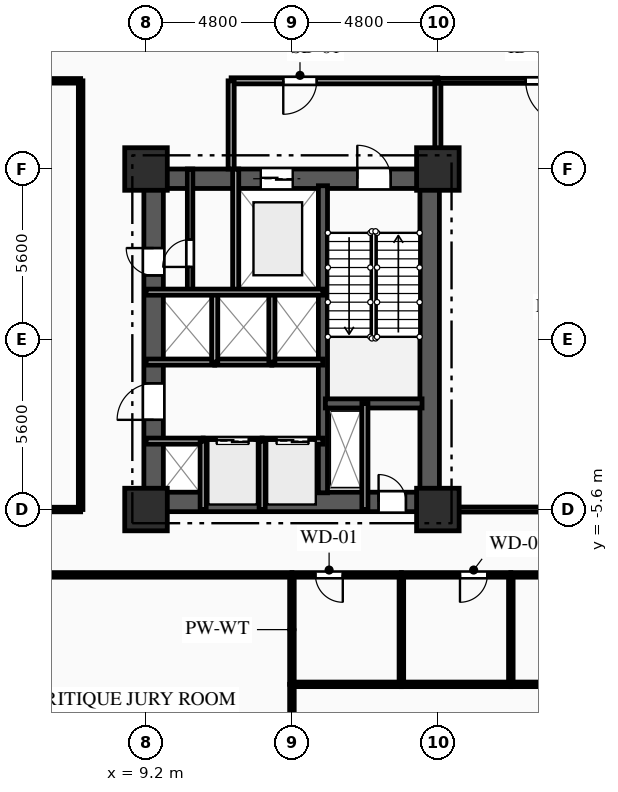
"""IFC4 building model, lengths in metres.
Left out: names, types, materials, properties, quantities, classifications, styles, units other than length and angle.
Written with IfcOpenShell. Run it as: python <this file> out.ifc"""

import sys

from ifc_helpers import new_model, si_unit, direction, frame, frame_2d, origin, origin_2d, place, context, subcontext, project, spatial, rectangle, extrude, element, fill, save


model = new_model("IFC4")
c1 = context("Model", 3, precision=1e-05, world=origin(), true_north=direction((0.0, 1.0)))
c2 = subcontext(c1, "Body", "Model", "MODEL_VIEW")
j1 = project(units=[si_unit("LENGTHUNIT", "METRE"), si_unit("PLANEANGLEUNIT", "RADIAN")], contexts=[c1])
p1 = place(None, origin())
s1 = spatial("IfcSite", under=j1, at=p1, CompositionType="ELEMENT")
p2 = place(p1, origin())
s2 = spatial("IfcBuilding", under=s1, at=p2, CompositionType="ELEMENT")
p3 = place(p2, frame((0.0, 0.0, 9.0)))
s3 = spatial("IfcBuildingStorey", under=s2, at=p3, CompositionType="ELEMENT", Elevation=9.0)
for number, where, z_axis, x_axis in (
    (1, (9.2, -5.6, 0.0), (0.0, 0.0, 1.0), (1.0, 0.0, 0.0)),
    (2, (9.2, 5.6, 0.0), (0.0, 0.0, 1.0), (1.0, 0.0, 0.0)),
    (3, (18.8, -5.6, 0.0), (0.0, 0.0, 1.0), (1.0, 0.0, 0.0)),
    (4, (18.8, 5.6, 0.0), (0.0, 0.0, 1.0), (1.0, 0.0, 0.0)),
):
    element("IfcColumn", number, at=place(p3, frame(where, z_axis=z_axis, x_axis=x_axis)), inside=s3, PredefinedType="COLUMN", context=c2, shape_type="SweptSolid", body=[
        extrude(rectangle(XDim=1.4, YDim=1.4, at=origin_2d()), origin(), (0.0, 0.0, 1.0), 4.5),
    ])
p4 = place(p3, frame((9.2, 5.28, 0.0), z_axis=(0.0, 0.0, 1.0), x_axis=(1.0, 0.0, 0.0)))
e5 = element("IfcWall", 5, at=p4, inside=s3, PredefinedType="SHEAR", context=c2, shape_type="SweptSolid", body=[
    extrude(rectangle(XDim=9.6, YDim=0.64, at=frame_2d((4.8, 0.0))), origin(), (0.0, 0.0, 1.0), 4.17),
])
p5 = place(p4, frame((6.95, 0.0, 0.0)))
e6 = element("IfcOpeningElement", 6, at=p5, cuts=e5, PredefinedType="OPENING", context=c2, shape_type="SweptSolid", body=[
    extrude(rectangle(XDim=1.1, YDim=2.15, at=frame_2d((0.55, 1.075))), frame((0.0, 0.33, 0.0), z_axis=(0.0, -1.0, 0.0), x_axis=(1.0, 0.0, 0.0)), (0.0, 0.0, 1.0), 0.66),
])
p6 = place(p4, frame((3.775, 0.0, 0.0)))
e7 = element("IfcOpeningElement", 7, at=p6, cuts=e5, PredefinedType="OPENING", context=c2, shape_type="SweptSolid", body=[
    extrude(rectangle(XDim=1.05, YDim=2.1, at=frame_2d((0.525, 1.05))), frame((0.0, 0.33, 0.0), z_axis=(0.0, -1.0, 0.0), x_axis=(1.0, 0.0, 0.0)), (0.0, 0.0, 1.0), 0.66),
])
p7 = place(p3, frame((9.2, -5.35, 0.0), z_axis=(0.0, 0.0, 1.0), x_axis=(1.0, 0.0, 0.0)))
e8 = element("IfcWall", 8, at=p7, inside=s3, PredefinedType="SHEAR", context=c2, shape_type="SweptSolid", body=[
    extrude(rectangle(XDim=9.6, YDim=0.64, at=frame_2d((4.8, 0.0))), origin(), (0.0, 0.0, 1.0), 4.17),
])
p8 = place(p7, frame((7.65, 0.0, 0.0)))
e9 = element("IfcOpeningElement", 9, at=p8, cuts=e8, PredefinedType="OPENING", context=c2, shape_type="SweptSolid", body=[
    extrude(rectangle(XDim=0.9, YDim=2.1, at=frame_2d((0.45, 1.05))), frame((0.0, 0.33, 0.0), z_axis=(0.0, -1.0, 0.0), x_axis=(1.0, 0.0, 0.0)), (0.0, 0.0, 1.0), 0.66),
])
p9 = place(p3, frame((9.45, -5.05, 0.0), z_axis=(0.0, 0.0, 1.0), x_axis=(0.0, 1.0, 0.0)))
e10 = element("IfcWall", 10, at=p9, inside=s3, PredefinedType="SHEAR", context=c2, shape_type="SweptSolid", body=[
    extrude(rectangle(XDim=10.1, YDim=0.64, at=frame_2d((5.05, 0.0))), origin(), (0.0, 0.0, 1.0), 4.17),
])
p10 = place(p9, frame((7.15, 0.0, 0.0)))
e11 = element("IfcOpeningElement", 11, at=p10, cuts=e10, PredefinedType="OPENING", context=c2, shape_type="SweptSolid", body=[
    extrude(rectangle(XDim=0.9, YDim=2.1, at=frame_2d((0.45, 1.05))), frame((0.0, 0.33, 0.0), z_axis=(0.0, -1.0, 0.0), x_axis=(1.0, 0.0, 0.0)), (0.0, 0.0, 1.0), 0.66),
])
p11 = place(p9, frame((2.4, 0.0, 0.0)))
e12 = element("IfcOpeningElement", 12, at=p11, cuts=e10, PredefinedType="OPENING", context=c2, shape_type="SweptSolid", body=[
    extrude(rectangle(XDim=1.2, YDim=2.15, at=frame_2d((0.6, 1.075))), frame((0.0, 0.33, 0.0), z_axis=(0.0, -1.0, 0.0), x_axis=(1.0, 0.0, 0.0)), (0.0, 0.0, 1.0), 0.66),
])
p12 = place(p3, frame((18.53, -5.05, 0.0), z_axis=(0.0, 0.0, 1.0), x_axis=(0.0, 1.0, 0.0)))
e13 = element("IfcWall", 13, at=p12, inside=s3, PredefinedType="SHEAR", context=c2, shape_type="SweptSolid", body=[
    extrude(rectangle(XDim=10.1, YDim=0.64, at=frame_2d((5.05, 0.0))), origin(), (0.0, 0.0, 1.0), 4.17),
])
p13 = place(p3, frame((15.02, -5.05, 0.0), z_axis=(0.0, 0.0, 1.0), x_axis=(0.0, 1.0, 0.0)))
e14 = element("IfcWall", 14, at=p13, inside=s3, PredefinedType="SHEAR", context=c2, shape_type="SweptSolid", body=[
    extrude(rectangle(XDim=10.1, YDim=0.3, at=frame_2d((5.05, 0.0))), origin(), (0.0, 0.0, 1.0), 4.17),
])
p14 = place(p3, frame((15.1, -2.11, 0.0), z_axis=(0.0, 0.0, 1.0), x_axis=(1.0, 0.0, 0.0)))
e15 = element("IfcWall", 15, at=p14, inside=s3, PredefinedType="SHEAR", context=c2, shape_type="SweptSolid", body=[
    extrude(rectangle(XDim=3.18, YDim=0.3, at=frame_2d((1.59, 0.0))), origin(), (0.0, 0.0, 1.0), 4.17),
])
p15 = place(p3, frame((16.4, -2.11, 0.0), z_axis=(0.0, 0.0, 1.0), x_axis=(0.0, -1.0, 0.0)))
e16 = element("IfcWall", 16, at=p15, inside=s3, PredefinedType="PARTITIONING", context=c2, shape_type="SweptSolid", body=[
    extrude(rectangle(XDim=3.49, YDim=0.2, at=frame_2d((1.745, 0.0))), origin(), (0.0, 0.0, 1.0), 4.17),
])
p16 = place(p3, frame((12.15, 5.6, 0.0), z_axis=(0.0, 0.0, 1.0), x_axis=(0.0, -1.0, 0.0)))
e17 = element("IfcWall", 17, at=p16, inside=s3, PredefinedType="PARTITIONING", context=c2, shape_type="SweptSolid", body=[
    extrude(rectangle(XDim=4.05, YDim=0.2, at=frame_2d((2.025, 0.0))), origin(), (0.0, 0.0, 1.0), 4.17),
])
p17 = place(p3, frame((18.8, 8.5, 0.0), z_axis=(0.0, 0.0, 1.0), x_axis=(-1.0, 0.0, 0.0)))
e18 = element("IfcWall", 18, at=p17, inside=s3, PredefinedType="PARTITIONING", context=c2, shape_type="SweptSolid", body=[
    extrude(rectangle(XDim=6.8, YDim=0.2, at=frame_2d((3.4, 0.0))), origin(), (0.0, 0.0, 1.0), 4.17),
])
p18 = place(p17, frame((3.985, 0.0, 0.0)))
e19 = element("IfcOpeningElement", 19, at=p18, cuts=e18, PredefinedType="OPENING", context=c2, shape_type="SweptSolid", body=[
    extrude(rectangle(XDim=1.1, YDim=2.15, at=frame_2d((0.55, 1.075))), frame((0.0, 0.11, 0.0), z_axis=(0.0, -1.0, 0.0), x_axis=(1.0, 0.0, 0.0)), (0.0, 0.0, 1.0), 0.22),
])
p19 = place(p3, frame((12.0, 8.5, 0.0), z_axis=(0.0, 0.0, 1.0), x_axis=(0.0, -1.0, 0.0)))
e20 = element("IfcWall", 20, at=p19, inside=s3, PredefinedType="PARTITIONING", context=c2, shape_type="SweptSolid", body=[
    extrude(rectangle(XDim=2.9, YDim=0.2, at=frame_2d((1.45, 0.0))), origin(), (0.0, 0.0, 1.0), 4.17),
])
p20 = place(p3, frame((18.8, 5.6, 0.0), z_axis=(0.0, 0.0, 1.0), x_axis=(0.0, 1.0, 0.0)))
e21 = element("IfcWall", 21, at=p20, inside=s3, PredefinedType="PARTITIONING", context=c2, shape_type="SweptSolid", body=[
    extrude(rectangle(XDim=2.9, YDim=0.2, at=frame_2d((1.45, 0.0))), origin(), (0.0, 0.0, 1.0), 3.655),
])
p21 = place(p3, frame((10.65, 1.55, 0.0), z_axis=(0.0, 0.0, 1.0), x_axis=(0.0, 1.0, 0.0)))
e22 = element("IfcWall", 22, at=p21, inside=s3, PredefinedType="PARTITIONING", context=c2, shape_type="SweptSolid", body=[
    extrude(rectangle(XDim=4.05, YDim=0.18, at=frame_2d((2.025, 0.0))), origin(), (0.0, 0.0, 1.0), 4.17),
])
p22 = place(p21, frame((0.829, 0.0, 0.0)))
e23 = element("IfcOpeningElement", 23, at=p22, cuts=e22, PredefinedType="OPENING", context=c2, shape_type="SweptSolid", body=[
    extrude(rectangle(XDim=0.9, YDim=2.1, at=frame_2d((0.45, 1.05))), frame((0.0, 0.1, 0.0), z_axis=(0.0, -1.0, 0.0), x_axis=(1.0, 0.0, 0.0)), (0.0, 0.0, 1.0), 0.2),
])
p23 = place(p3, frame((9.2, -3.35, 0.0), z_axis=(0.0, 0.0, 1.0), x_axis=(1.0, 0.0, 0.0)))
e24 = element("IfcWall", 24, at=p23, inside=s3, PredefinedType="PARTITIONING", context=c2, shape_type="SweptSolid", body=[
    extrude(rectangle(XDim=1.88, YDim=0.2, at=frame_2d((0.94, 0.0))), origin(), (0.0, 0.0, 1.0), 3.885),
])
p24 = place(p3, frame((11.08, -3.35, 0.0), z_axis=(0.0, 0.0, 1.0), x_axis=(1.0, 0.0, 0.0)))
e25 = element("IfcWall", 25, at=p24, inside=s3, PredefinedType="PARTITIONING", context=c2, shape_type="SweptSolid", body=[
    extrude(rectangle(XDim=1.94, YDim=0.2, at=frame_2d((0.97, 0.0))), origin(), (0.0, 0.0, 1.0), 4.17),
])
p25 = place(p24, frame((0.445, 0.0, 0.0)))
e26 = element("IfcOpeningElement", 26, at=p25, cuts=e25, PredefinedType="OPENING", context=c2, shape_type="SweptSolid", body=[
    extrude(rectangle(XDim=1.05, YDim=2.1, at=frame_2d((0.525, 1.05))), frame((0.0, 0.11, 0.0), z_axis=(0.0, -1.0, 0.0), x_axis=(1.0, 0.0, 0.0)), (0.0, 0.0, 1.0), 0.22),
])
p26 = place(p3, frame((13.02, -3.35, 0.0), z_axis=(0.0, 0.0, 1.0), x_axis=(1.0, 0.0, 0.0)))
e27 = element("IfcWall", 27, at=p26, inside=s3, PredefinedType="PARTITIONING", context=c2, shape_type="SweptSolid", body=[
    extrude(rectangle(XDim=2.0, YDim=0.2, at=frame_2d((1.0, 0.0))), origin(), (0.0, 0.0, 1.0), 4.17),
])
p27 = place(p26, frame((0.475, 0.0, 0.0)))
e28 = element("IfcOpeningElement", 28, at=p27, cuts=e27, PredefinedType="OPENING", context=c2, shape_type="SweptSolid", body=[
    extrude(rectangle(XDim=1.05, YDim=2.1, at=frame_2d((0.525, 1.05))), frame((0.0, 0.11, 0.0), z_axis=(0.0, -1.0, 0.0), x_axis=(1.0, 0.0, 0.0)), (0.0, 0.0, 1.0), 0.22),
])
p28 = place(p3, frame((11.46, -0.75, 0.0), z_axis=(0.0, 0.0, 1.0), x_axis=(-1.0, 0.0, 0.0)))
e29 = element("IfcWall", 29, at=p28, inside=s3, PredefinedType="PARTITIONING", context=c2, shape_type="SweptSolid", body=[
    extrude(rectangle(XDim=2.26, YDim=0.2, at=frame_2d((1.13, 0.0))), origin(), (0.0, 0.0, 1.0), 4.17),
])
p29 = place(p3, frame((13.34, -0.75, 0.0), z_axis=(0.0, 0.0, 1.0), x_axis=(-1.0, 0.0, 0.0)))
e30 = element("IfcWall", 30, at=p29, inside=s3, PredefinedType="PARTITIONING", context=c2, shape_type="SweptSolid", body=[
    extrude(rectangle(XDim=1.88, YDim=0.2, at=frame_2d((0.94, 0.0))), origin(), (0.0, 0.0, 1.0), 4.17),
])
p30 = place(p3, frame((15.02, -0.75, 0.0), z_axis=(0.0, 0.0, 1.0), x_axis=(-1.0, 0.0, 0.0)))
e31 = element("IfcWall", 31, at=p30, inside=s3, PredefinedType="PARTITIONING", context=c2, shape_type="SweptSolid", body=[
    extrude(rectangle(XDim=1.68, YDim=0.2, at=frame_2d((0.84, 0.0))), origin(), (0.0, 0.0, 1.0), 4.17),
])
for number, where, z_axis, x_axis in (
    (32, (11.08, -5.6, 0.0), (0.0, 0.0, 1.0), (0.0, 1.0, 0.0)),
    (33, (13.02, -5.6, 0.0), (0.0, 0.0, 1.0), (0.0, 1.0, 0.0)),
):
    element("IfcWall", number, at=place(p3, frame(where, z_axis=z_axis, x_axis=x_axis)), inside=s3, PredefinedType="PARTITIONING", context=c2, shape_type="SweptSolid", body=[
        extrude(rectangle(XDim=2.25, YDim=0.2, at=frame_2d((1.125, 0.0))), origin(), (0.0, 0.0, 1.0), 4.17),
    ])
for number, where, z_axis, x_axis in (
    (34, (11.46, -0.75, 0.0), (0.0, 0.0, 1.0), (0.0, 1.0, 0.0)),
    (35, (13.34, -0.75, 0.0), (0.0, 0.0, 1.0), (0.0, 1.0, 0.0)),
):
    element("IfcWall", number, at=place(p3, frame(where, z_axis=z_axis, x_axis=x_axis)), inside=s3, PredefinedType="PARTITIONING", context=c2, shape_type="SweptSolid", body=[
        extrude(rectangle(XDim=2.3, YDim=0.2, at=frame_2d((1.15, 0.0))), origin(), (0.0, 0.0, 1.0), 4.17),
    ])
p31 = place(p3, frame((7.05, 8.5, 0.0), z_axis=(0.0, 0.0, 1.0), x_axis=(-1.0, 0.0, 0.0)))
e36 = element("IfcWall", 36, at=p31, inside=s3, PredefinedType="PARTITIONING", context=c2, shape_type="SweptSolid", body=[
    extrude(rectangle(XDim=7.05, YDim=0.15, at=frame_2d((3.525, 0.0))), origin(), (0.0, 0.0, 1.0), 4.17),
])
p32 = place(p3, frame((24.0, 8.5, 0.0), z_axis=(0.0, 0.0, 1.0), x_axis=(-1.0, 0.0, 0.0)))
e37 = element("IfcWall", 37, at=p32, inside=s3, PredefinedType="PARTITIONING", context=c2, shape_type="SweptSolid", body=[
    extrude(rectangle(XDim=5.2, YDim=0.165, at=frame_2d((2.6, 0.0))), origin(), (0.0, 0.0, 1.0), 4.17),
])
p33 = place(p32, frame((0.91, 0.0, 0.0)))
e38 = element("IfcOpeningElement", 38, at=p33, cuts=e37, PredefinedType="OPENING", context=c2, shape_type="SweptSolid", body=[
    extrude(rectangle(XDim=1.4, YDim=2.3, at=frame_2d((0.7, 1.15))), frame((0.0, 0.093, 0.0), z_axis=(0.0, -1.0, 0.0), x_axis=(1.0, 0.0, 0.0)), (0.0, 0.0, 1.0), 0.185),
])
p34 = place(p3, frame((14.0, -7.75, 0.0), z_axis=(0.0, 0.0, 1.0), x_axis=(-1.0, 0.0, 0.0)))
e39 = element("IfcWall", 39, at=p34, inside=s3, PredefinedType="PARTITIONING", context=c2, shape_type="SweptSolid", body=[
    extrude(rectangle(XDim=14.0, YDim=0.15, at=frame_2d((7.0, 0.0))), origin(), (0.0, 0.0, 1.0), 4.17),
])
p35 = place(p34, frame((10.896, 0.0, 0.0)))
e40 = element("IfcOpeningElement", 40, at=p35, cuts=e39, PredefinedType="OPENING", context=c2, shape_type="SweptSolid", body=[
    extrude(rectangle(XDim=1.05, YDim=2.15, at=frame_2d((0.525, 1.075))), frame((0.0, 0.085, 0.0), z_axis=(0.0, -1.0, 0.0), x_axis=(1.0, 0.0, 0.0)), (0.0, 0.0, 1.0), 0.17),
])
p36 = place(p3, frame((17.6, -7.75, 0.0), z_axis=(0.0, 0.0, 1.0), x_axis=(-1.0, 0.0, 0.0)))
e41 = element("IfcWall", 41, at=p36, inside=s3, PredefinedType="PLUMBINGWALL", context=c2, shape_type="SweptSolid", body=[
    extrude(rectangle(XDim=3.6, YDim=0.15, at=frame_2d((1.8, 0.0))), origin(), (0.0, 0.0, 1.0), 4.17),
])
p37 = place(p36, frame((1.927, 0.0, 0.0)))
e42 = element("IfcOpeningElement", 42, at=p37, cuts=e41, PredefinedType="OPENING", context=c2, shape_type="SweptSolid", body=[
    extrude(rectangle(XDim=0.9, YDim=2.1, at=frame_2d((0.45, 1.05))), frame((0.0, 0.085, 0.0), z_axis=(0.0, -1.0, 0.0), x_axis=(1.0, 0.0, 0.0)), (0.0, 0.0, 1.0), 0.17),
])
p38 = place(p3, frame((21.2, -7.75, 0.0), z_axis=(0.0, 0.0, 1.0), x_axis=(-1.0, 0.0, 0.0)))
e43 = element("IfcWall", 43, at=p38, inside=s3, PredefinedType="PLUMBINGWALL", context=c2, shape_type="SweptSolid", body=[
    extrude(rectangle(XDim=3.6, YDim=0.15, at=frame_2d((1.8, 0.0))), origin(), (0.0, 0.0, 1.0), 4.17),
])
p39 = place(p38, frame((0.772, 0.0, 0.0)))
e44 = element("IfcOpeningElement", 44, at=p39, cuts=e43, PredefinedType="OPENING", context=c2, shape_type="SweptSolid", body=[
    extrude(rectangle(XDim=0.9, YDim=2.1, at=frame_2d((0.45, 1.05))), frame((0.0, 0.085, 0.0), z_axis=(0.0, -1.0, 0.0), x_axis=(1.0, 0.0, 0.0)), (0.0, 0.0, 1.0), 0.17),
])
p40 = place(p3, frame((24.0, -7.75, 0.0), z_axis=(0.0, 0.0, 1.0), x_axis=(-1.0, 0.0, 0.0)))
e45 = element("IfcWall", 45, at=p40, inside=s3, PredefinedType="PARTITIONING", context=c2, shape_type="SweptSolid", body=[
    extrude(rectangle(XDim=2.8, YDim=0.15, at=frame_2d((1.4, 0.0))), origin(), (0.0, 0.0, 1.0), 4.17),
])
p41 = place(p40, frame((0.666, 0.0, 0.0)))
e46 = element("IfcOpeningElement", 46, at=p41, cuts=e45, PredefinedType="OPENING", context=c2, shape_type="SweptSolid", body=[
    extrude(rectangle(XDim=0.95, YDim=2.1, at=frame_2d((0.475, 1.05))), frame((0.0, 0.085, 0.0), z_axis=(0.0, -1.0, 0.0), x_axis=(1.0, 0.0, 0.0)), (0.0, 0.0, 1.0), 0.17),
])
p42 = place(p3, frame((0.0, -5.6, 0.0), z_axis=(0.0, 0.0, 1.0), x_axis=(1.0, 0.0, 0.0)))
e47 = element("IfcWall", 47, at=p42, inside=s3, PredefinedType="PARTITIONING", context=c2, shape_type="SweptSolid", body=[
    extrude(rectangle(XDim=7.05, YDim=0.15, at=frame_2d((3.525, 0.0))), origin(), (0.0, 0.0, 1.0), 3.147),
])
p43 = place(p3, frame((18.8, -5.6, 0.0), z_axis=(0.0, 0.0, 1.0), x_axis=(1.0, 0.0, 0.0)))
e48 = element("IfcWall", 48, at=p43, inside=s3, PredefinedType="PARTITIONING", context=c2, shape_type="SweptSolid", body=[
    extrude(rectangle(XDim=5.2, YDim=0.165, at=frame_2d((2.6, 0.0))), origin(), (0.0, 0.0, 1.0), 4.17),
])
p44 = place(p3, frame((7.05, -5.6, 0.0), z_axis=(0.0, 0.0, 1.0), x_axis=(0.0, 1.0, 0.0)))
e49 = element("IfcWall", 49, at=p44, inside=s3, PredefinedType="PARTITIONING", context=c2, shape_type="SweptSolid", body=[
    extrude(rectangle(XDim=14.1, YDim=0.15, at=frame_2d((7.05, 0.0))), origin(), (0.0, 0.0, 1.0), 4.17),
])
p45 = place(p3, frame((14.0, -7.75, 0.0), z_axis=(0.0, 0.0, 1.0), x_axis=(0.0, -1.0, 0.0)))
e50 = element("IfcWall", 50, at=p45, inside=s3, PredefinedType="PLUMBINGWALL", context=c2, shape_type="SweptSolid", body=[
    extrude(rectangle(XDim=3.6, YDim=0.15, at=frame_2d((1.8, 0.0))), origin(), (0.0, 0.0, 1.0), 4.17),
])
p46 = place(p3, frame((14.0, -11.35, 0.0), z_axis=(0.0, 0.0, 1.0), x_axis=(0.0, -1.0, 0.0)))
e51 = element("IfcWall", 51, at=p46, inside=s3, PredefinedType="PARTITIONING", context=c2, shape_type="SweptSolid", body=[
    extrude(rectangle(XDim=13.45, YDim=0.15, at=frame_2d((6.725, 0.0))), origin(), (0.0, 0.0, 1.0), 4.17),
])
for number, where, z_axis, x_axis in (
    (52, (17.6, -7.75, 0.0), (0.0, 0.0, 1.0), (0.0, -1.0, 0.0)),
    (53, (17.6, -11.35, 0.0), (0.0, 0.0, 1.0), (-1.0, 0.0, 0.0)),
    (54, (21.2, -7.75, 0.0), (0.0, 0.0, 1.0), (0.0, -1.0, 0.0)),
):
    element("IfcWall", number, at=place(p3, frame(where, z_axis=z_axis, x_axis=x_axis)), inside=s3, PredefinedType="PLUMBINGWALL", context=c2, shape_type="SweptSolid", body=[
        extrude(rectangle(XDim=3.6, YDim=0.15, at=frame_2d((1.8, 0.0))), origin(), (0.0, 0.0, 1.0), 4.17),
    ])
p47 = place(p3, frame((21.2, -11.35, 0.0), z_axis=(0.0, 0.0, 1.0), x_axis=(-1.0, 0.0, 0.0)))
e55 = element("IfcWall", 55, at=p47, inside=s3, PredefinedType="PLUMBINGWALL", context=c2, shape_type="SweptSolid", body=[
    extrude(rectangle(XDim=3.6, YDim=0.15, at=frame_2d((1.8, 0.0))), origin(), (0.0, 0.0, 1.0), 4.17),
])
p48 = place(p3, frame((24.0, -11.35, 0.0), z_axis=(0.0, 0.0, 1.0), x_axis=(-1.0, 0.0, 0.0)))
e56 = element("IfcWall", 56, at=p48, inside=s3, PredefinedType="PARTITIONING", context=c2, shape_type="SweptSolid", body=[
    extrude(rectangle(XDim=2.8, YDim=0.15, at=frame_2d((1.4, 0.0))), origin(), (0.0, 0.0, 1.0), 4.17),
])
p49 = place(p48, frame((0.666, 0.0, 0.0)))
e57 = element("IfcOpeningElement", 57, at=p49, cuts=e56, PredefinedType="OPENING", context=c2, shape_type="SweptSolid", body=[
    extrude(rectangle(XDim=0.95, YDim=2.1, at=frame_2d((0.475, 1.05))), frame((0.0, 0.085, 0.0), z_axis=(0.0, -1.0, 0.0), x_axis=(1.0, 0.0, 0.0)), (0.0, 0.0, 1.0), 0.17),
])
p50 = place(p3, frame((9.2, 1.55, 0.0), z_axis=(0.0, 0.0, 1.0), x_axis=(1.0, 0.0, 0.0)))
e58 = element("IfcWall", 58, at=p50, inside=s3, PredefinedType="PARTITIONING", context=c2, shape_type="SweptSolid", body=[
    extrude(rectangle(XDim=5.82, YDim=0.2, at=frame_2d((2.91, 0.0))), origin(), (0.0, 0.0, 1.0), 4.17),
])
p51 = place(p5, origin())
e59 = element("IfcDoor", 59, at=p51, inside=s3, OperationType="SINGLE_SWING_LEFT", PredefinedType="DOOR", context=c2, shape_type="SweptSolid", body=[
    extrude(rectangle(XDim=1.1, YDim=2.15, at=frame_2d((0.55, 1.075))), frame((0.0, 0.025, 0.0), z_axis=(0.0, -1.0, 0.0), x_axis=(1.0, 0.0, 0.0)), (0.0, 0.0, 1.0), 0.05),
])
fill(e6, e59)
p52 = place(p6, origin())
e60 = element("IfcDoor", 60, at=p52, inside=s3, OperationType="DOUBLE_DOOR_SLIDING", PredefinedType="DOOR", context=c2, shape_type="SweptSolid", body=[
    extrude(rectangle(XDim=1.05, YDim=2.1, at=frame_2d((0.525, 1.05))), frame((0.0, 0.025, 0.0), z_axis=(0.0, -1.0, 0.0), x_axis=(1.0, 0.0, 0.0)), (0.0, 0.0, 1.0), 0.05),
])
fill(e7, e60)
p53 = place(p8, origin())
e61 = element("IfcDoor", 61, at=p53, inside=s3, OperationType="SINGLE_SWING_LEFT", PredefinedType="DOOR", context=c2, shape_type="SweptSolid", body=[
    extrude(rectangle(XDim=0.9, YDim=2.1, at=frame_2d((0.45, 1.05))), frame((0.0, 0.025, 0.0), z_axis=(0.0, -1.0, 0.0), x_axis=(1.0, 0.0, 0.0)), (0.0, 0.0, 1.0), 0.05),
])
fill(e9, e61)
p54 = place(p18, origin())
e62 = element("IfcDoor", 62, at=p54, inside=s3, OperationType="SINGLE_SWING_RIGHT", PredefinedType="DOOR", context=c2, shape_type="SweptSolid", body=[
    extrude(rectangle(XDim=1.1, YDim=2.15, at=frame_2d((0.55, 1.075))), frame((0.0, 0.025, 0.0), z_axis=(0.0, -1.0, 0.0), x_axis=(1.0, 0.0, 0.0)), (0.0, 0.0, 1.0), 0.05),
])
fill(e19, e62)
p55 = place(p22, origin())
e63 = element("IfcDoor", 63, at=p55, inside=s3, OperationType="SINGLE_SWING_LEFT", PredefinedType="DOOR", context=c2, shape_type="SweptSolid", body=[
    extrude(rectangle(XDim=0.9, YDim=2.1, at=frame_2d((0.45, 1.05))), frame((0.0, 0.025, 0.0), z_axis=(0.0, -1.0, 0.0), x_axis=(1.0, 0.0, 0.0)), (0.0, 0.0, 1.0), 0.05),
])
fill(e23, e63)
p56 = place(p10, origin())
e64 = element("IfcDoor", 64, at=p56, inside=s3, OperationType="SINGLE_SWING_RIGHT", PredefinedType="DOOR", context=c2, shape_type="SweptSolid", body=[
    extrude(rectangle(XDim=0.9, YDim=2.1, at=frame_2d((0.45, 1.05))), frame((0.0, 0.025, 0.0), z_axis=(0.0, -1.0, 0.0), x_axis=(1.0, 0.0, 0.0)), (0.0, 0.0, 1.0), 0.05),
])
fill(e11, e64)
p57 = place(p25, origin())
e65 = element("IfcDoor", 65, at=p57, inside=s3, OperationType="DOUBLE_DOOR_SLIDING", PredefinedType="DOOR", context=c2, shape_type="SweptSolid", body=[
    extrude(rectangle(XDim=1.05, YDim=2.1, at=frame_2d((0.525, 1.05))), frame((0.0, 0.025, 0.0), z_axis=(0.0, -1.0, 0.0), x_axis=(1.0, 0.0, 0.0)), (0.0, 0.0, 1.0), 0.05),
])
fill(e26, e65)
p58 = place(p27, origin())
e66 = element("IfcDoor", 66, at=p58, inside=s3, OperationType="DOUBLE_DOOR_SLIDING", PredefinedType="DOOR", context=c2, shape_type="SweptSolid", body=[
    extrude(rectangle(XDim=1.05, YDim=2.1, at=frame_2d((0.525, 1.05))), frame((0.0, 0.025, 0.0), z_axis=(0.0, -1.0, 0.0), x_axis=(1.0, 0.0, 0.0)), (0.0, 0.0, 1.0), 0.05),
])
fill(e28, e66)
p59 = place(p11, origin())
e67 = element("IfcDoor", 67, at=p59, inside=s3, OperationType="SINGLE_SWING_LEFT", PredefinedType="DOOR", context=c2, shape_type="SweptSolid", body=[
    extrude(rectangle(XDim=1.2, YDim=2.15, at=frame_2d((0.6, 1.075))), frame((0.0, 0.025, 0.0), z_axis=(0.0, -1.0, 0.0), x_axis=(1.0, 0.0, 0.0)), (0.0, 0.0, 1.0), 0.05),
])
fill(e12, e67)
p60 = place(p33, origin())
e68 = element("IfcDoor", 68, at=p60, inside=s3, OperationType="SINGLE_SWING_LEFT", PredefinedType="DOOR", context=c2, shape_type="SweptSolid", body=[
    extrude(rectangle(XDim=1.4, YDim=2.3, at=frame_2d((0.7, 1.15))), frame((0.0, 0.025, 0.0), z_axis=(0.0, -1.0, 0.0), x_axis=(1.0, 0.0, 0.0)), (0.0, 0.0, 1.0), 0.05),
])
fill(e38, e68)
p61 = place(p37, origin())
e69 = element("IfcDoor", 69, at=p61, inside=s3, OperationType="SINGLE_SWING_LEFT", PredefinedType="DOOR", context=c2, shape_type="SweptSolid", body=[
    extrude(rectangle(XDim=0.9, YDim=2.1, at=frame_2d((0.45, 1.05))), frame((0.0, 0.025, 0.0), z_axis=(0.0, -1.0, 0.0), x_axis=(1.0, 0.0, 0.0)), (0.0, 0.0, 1.0), 0.05),
])
fill(e42, e69)
p62 = place(p39, origin())
e70 = element("IfcDoor", 70, at=p62, inside=s3, OperationType="SINGLE_SWING_RIGHT", PredefinedType="DOOR", context=c2, shape_type="SweptSolid", body=[
    extrude(rectangle(XDim=0.9, YDim=2.1, at=frame_2d((0.45, 1.05))), frame((0.0, 0.025, 0.0), z_axis=(0.0, -1.0, 0.0), x_axis=(1.0, 0.0, 0.0)), (0.0, 0.0, 1.0), 0.05),
])
fill(e44, e70)
save(model, sys.argv[1])
